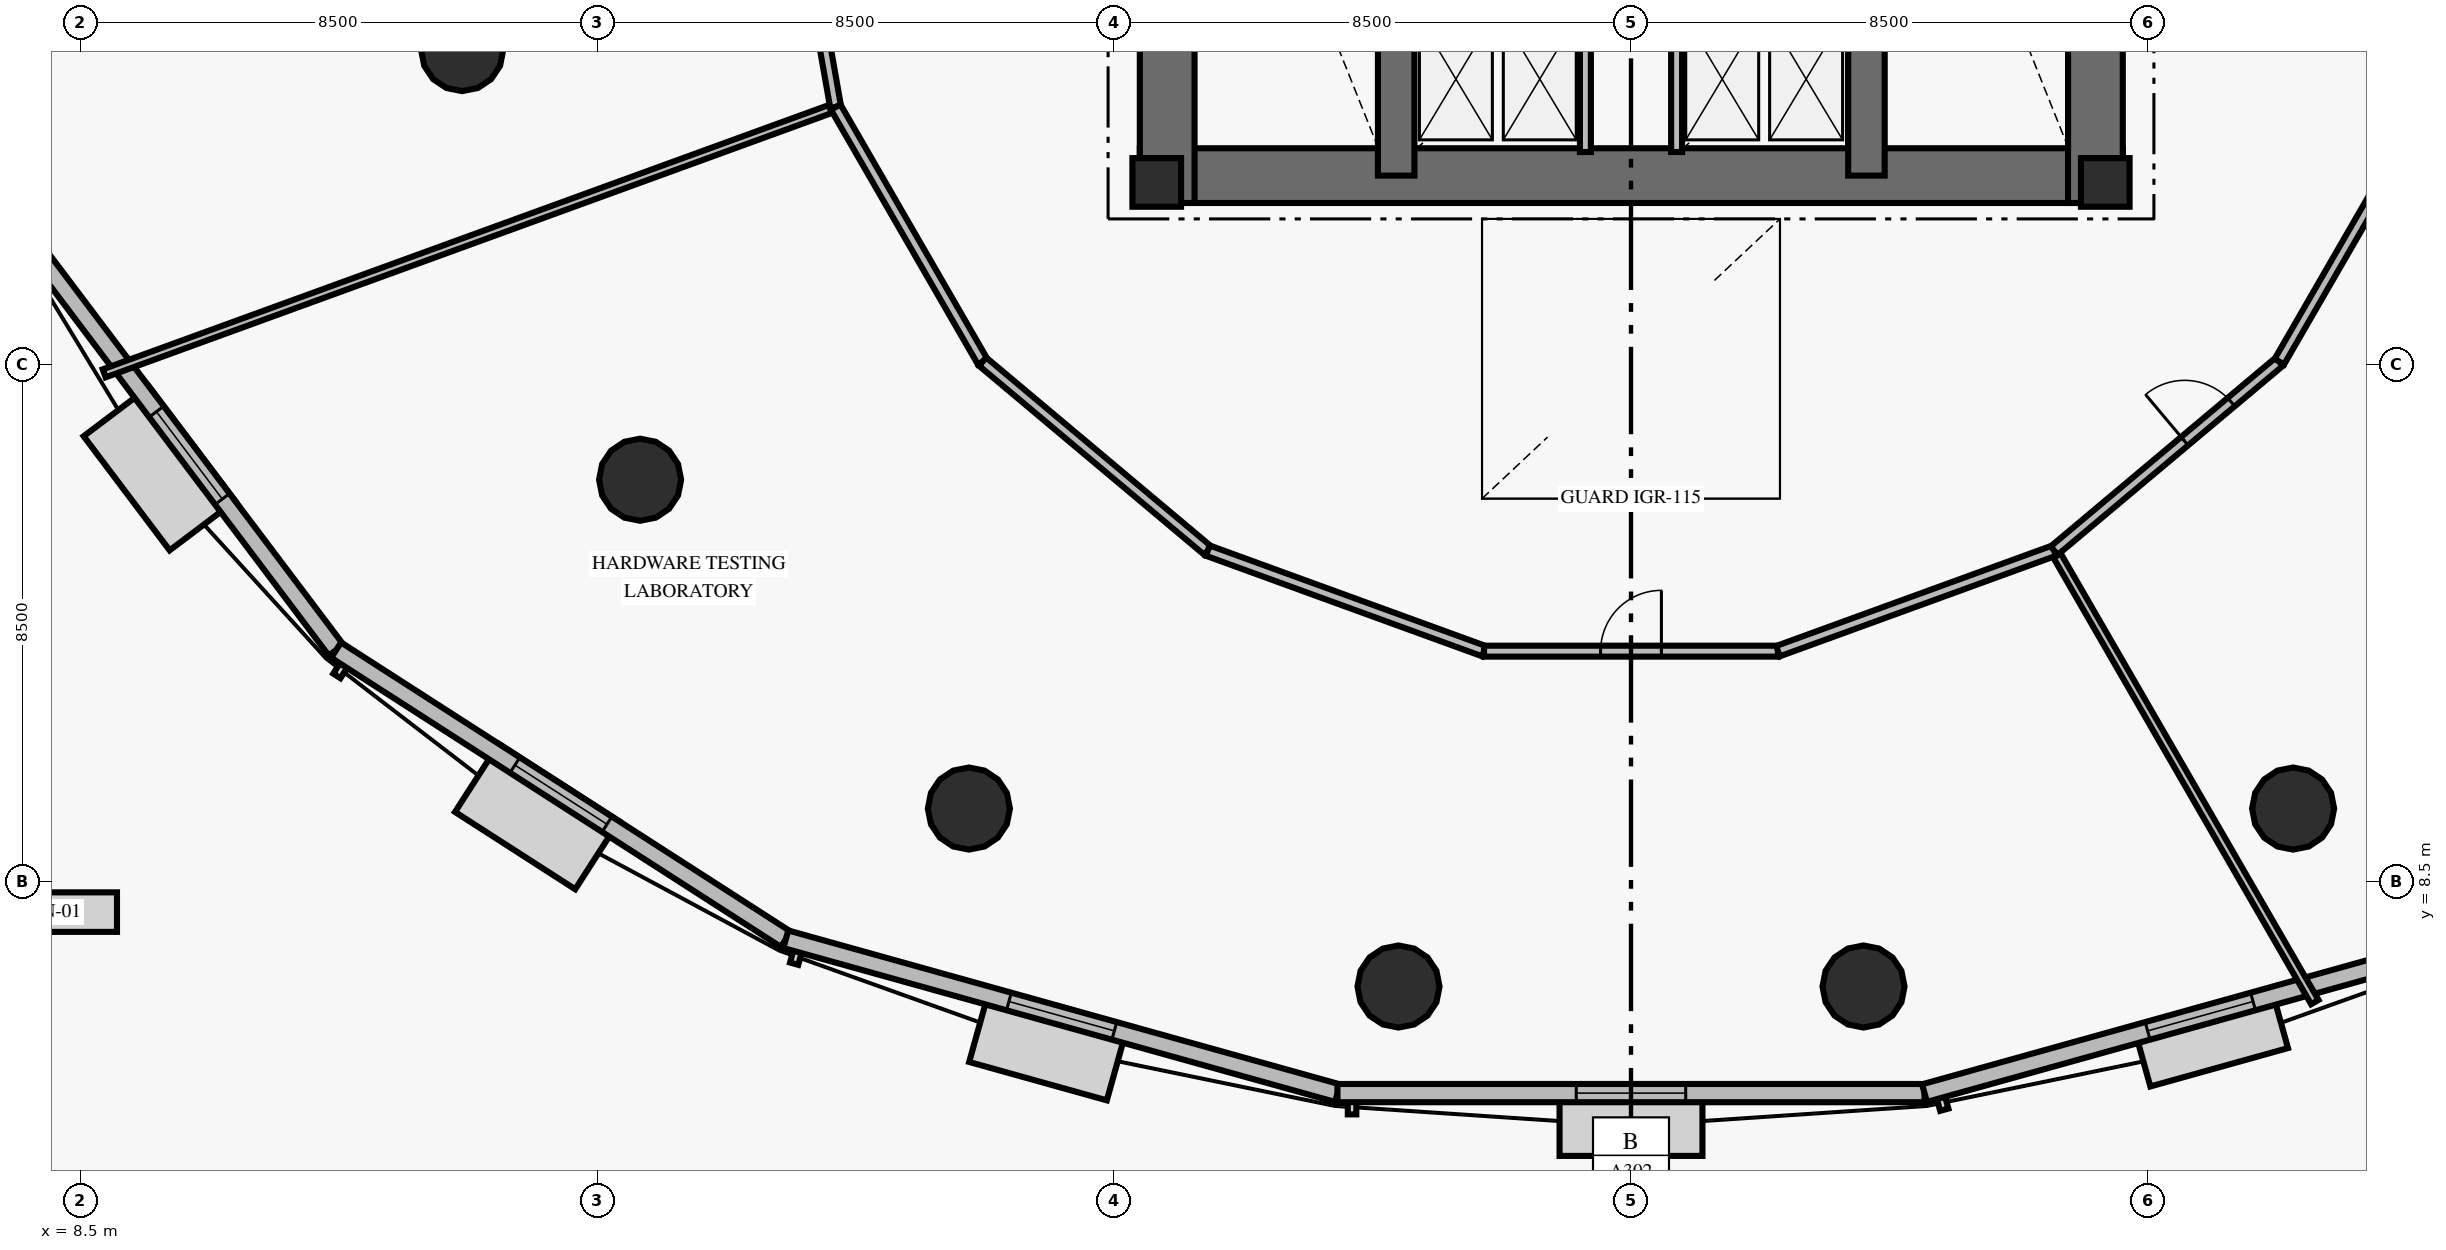
"""IFC4 building model, lengths in metres.
Left out: names, types, materials, properties, quantities, classifications, styles, units other than length and angle.
Written with IfcOpenShell. Run it as: python <this file> out.ifc"""

import sys

from ifc_helpers import new_model, si_unit, direction, frame, frame_2d, origin, origin_2d, place, context, subcontext, project, spatial, rectangle, circle, extrude, element, fill, save


model = new_model("IFC4")
c1 = context("Model", 3, precision=1e-05, world=origin(), true_north=direction((0.0, 1.0)))
c2 = subcontext(c1, "Body", "Model", "MODEL_VIEW")
j1 = project(units=[si_unit("LENGTHUNIT", "METRE"), si_unit("PLANEANGLEUNIT", "RADIAN")], contexts=[c1])
p1 = place(None, origin())
s1 = spatial("IfcSite", under=j1, at=p1, CompositionType="ELEMENT")
p2 = place(p1, origin())
s2 = spatial("IfcBuilding", under=s1, at=p2, CompositionType="ELEMENT")
p3 = place(p2, frame((0.0, 0.0, 30.0)))
s3 = spatial("IfcBuildingStorey", under=s2, at=p3, CompositionType="ELEMENT", Elevation=30.0)
p4 = place(p3, frame((25.922, 20.112, 0.0), z_axis=(0.0, 0.0, 1.0), x_axis=(1.0, 0.0, 0.0)))
e1 = element("IfcWall", 1, at=p4, inside=s3, PredefinedType="SHEAR", context=c2, shape_type="SweptSolid", body=[
    extrude(rectangle(XDim=16.166, YDim=0.9, at=frame_2d((8.083, 0.0))), origin(), (0.0, 0.0, 1.0), 4.2),
])
for number, where, z_axis, x_axis in (
    (2, (26.372, 19.662, 0.0), (0.0, 0.0, 1.0), (0.0, 1.0, 0.0)),
    (3, (41.638, 19.662, 0.0), (0.0, 0.0, 1.0), (0.0, 1.0, 0.0)),
):
    element("IfcWall", number, at=place(p3, frame(where, z_axis=z_axis, x_axis=x_axis)), inside=s3, PredefinedType="SHEAR", context=c2, shape_type="SweptSolid", body=[
        extrude(rectangle(XDim=10.876, YDim=0.9, at=frame_2d((5.438, 0.0))), origin(), (0.0, 0.0, 1.0), 4.2),
    ])
for number, where, z_axis, x_axis in (
    (4, (30.138, 20.112, 0.0), (0.0, 0.0, 1.0), (0.0, 1.0, 0.0)),
    (5, (37.872, 20.112, 0.0), (0.0, 0.0, 1.0), (0.0, 1.0, 0.0)),
):
    element("IfcWall", number, at=place(p3, frame(where, z_axis=z_axis, x_axis=x_axis)), inside=s3, PredefinedType="SHEAR", context=c2, shape_type="SweptSolid", body=[
        extrude(rectangle(XDim=9.976, YDim=0.6, at=frame_2d((4.988, 0.0))), origin(), (0.0, 0.0, 1.0), 4.2),
    ])
for number, where, z_axis, x_axis in (
    (6, (26.2, 20.0, 0.0), (0.0, 0.0, 1.0), (1.0, 0.0, 0.0)),
    (7, (41.8, 20.0, 0.0), (0.0, 0.0, 1.0), (1.0, 0.0, 0.0)),
):
    element("IfcColumn", number, at=place(p3, frame(where, z_axis=z_axis, x_axis=x_axis)), inside=s3, PredefinedType="PILASTER", context=c2, shape_type="SweptSolid", body=[
        extrude(rectangle(XDim=0.8, YDim=0.8, at=origin_2d()), origin(), (0.0, 0.0, 1.0), 4.2),
    ])
for number, where, z_axis, x_axis in (
    (8, (14.777, 22.176, 0.0), (0.0, 0.0, 1.0), (1.0, 0.0, 0.0)),
    (9, (17.703, 15.111, 0.0), (0.0, 0.0, 1.0), (1.0, 0.0, 0.0)),
):
    element("IfcColumn", number, at=place(p3, frame(where, z_axis=z_axis, x_axis=x_axis)), inside=s3, PredefinedType="COLUMN", context=c2, shape_type="SweptSolid", body=[
        extrude(circle(Radius=0.675, at=origin_2d()), origin(), (0.0, 0.0, 1.0), 4.2),
    ])
p5 = place(p3, frame((23.111, 9.703, -0.28), z_axis=(0.0, 0.0, 1.0), x_axis=(1.0, 0.0, 0.0)))
e10 = element("IfcColumn", 10, at=p5, inside=s3, PredefinedType="COLUMN", context=c2, shape_type="SweptSolid", body=[
    extrude(circle(Radius=0.675, at=origin_2d()), origin(), (0.0, 0.0, 1.0), 4.48),
])
for number, where, z_axis, x_axis in (
    (11, (30.176, 6.777, 0.0), (0.0, 0.0, 1.0), (1.0, 0.0, 0.0)),
    (12, (37.824, 6.777, 0.0), (0.0, 0.0, 1.0), (1.0, 0.0, 0.0)),
):
    element("IfcColumn", number, at=place(p3, frame(where, z_axis=z_axis, x_axis=x_axis)), inside=s3, PredefinedType="COLUMN", context=c2, shape_type="SweptSolid", body=[
        extrude(circle(Radius=0.675, at=origin_2d()), origin(), (0.0, 0.0, 1.0), 4.2),
    ])
p6 = place(p3, frame((44.889, 9.703, -0.28), z_axis=(0.0, 0.0, 1.0), x_axis=(1.0, 0.0, 0.0)))
e13 = element("IfcColumn", 13, at=p6, inside=s3, PredefinedType="COLUMN", context=c2, shape_type="SweptSolid", body=[
    extrude(circle(Radius=0.675, at=origin_2d()), origin(), (0.0, 0.0, 1.0), 4.48),
])
p7 = place(p3, frame((7.876, 18.715, 0.0), z_axis=(0.0, 0.0, 1.0), x_axis=(0.601814793535, -0.798635683076, 0.0)))
e14 = element("IfcWall", 14, at=p7, inside=s3, PredefinedType="SOLIDWALL", context=c2, shape_type="SweptSolid", body=[
    extrude(rectangle(XDim=8.022, YDim=0.3, at=frame_2d((4.011, 0.0))), origin(), (0.0, 0.0, 1.0), 3.0),
])
p8 = place(p7, frame((3.111, 0.0, 0.8)))
e15 = element("IfcOpeningElement", 15, at=p8, cuts=e14, PredefinedType="OPENING", context=c2, shape_type="SweptSolid", body=[
    extrude(rectangle(XDim=1.8, YDim=1.95, at=frame_2d((0.9, 0.975))), frame((0.0, 0.16, 0.0), z_axis=(0.0, -1.0, 0.0), x_axis=(1.0, 0.0, 0.0)), (0.0, 0.0, 1.0), 0.32),
])
p9 = place(p3, frame((12.704, 12.309, 0.0), z_axis=(0.0, 0.0, 1.0), x_axis=(0.841162236031, -0.540782851685, 0.0)))
e16 = element("IfcWall", 16, at=p9, inside=s3, PredefinedType="SOLIDWALL", context=c2, shape_type="SweptSolid", body=[
    extrude(rectangle(XDim=8.792, YDim=0.3, at=frame_2d((4.396, 0.0))), origin(), (0.0, 0.0, 1.0), 3.0),
])
p10 = place(p9, frame((3.496, 0.0, 0.8)))
e17 = element("IfcOpeningElement", 17, at=p10, cuts=e16, PredefinedType="OPENING", context=c2, shape_type="SweptSolid", body=[
    extrude(rectangle(XDim=1.8, YDim=1.95, at=frame_2d((0.9, 0.975))), frame((0.0, 0.16, 0.0), z_axis=(0.0, -1.0, 0.0), x_axis=(1.0, 0.0, 0.0)), (0.0, 0.0, 1.0), 0.32),
])
p11 = place(p3, frame((20.1, 7.554, 0.0), z_axis=(0.0, 0.0, 1.0), x_axis=(0.963246695545, -0.268618323133, 0.0)))
e18 = element("IfcWall", 18, at=p11, inside=s3, PredefinedType="SOLIDWALL", context=c2, shape_type="SweptSolid", body=[
    extrude(rectangle(XDim=9.419, YDim=0.3, at=frame_2d((4.709, 0.0))), origin(), (0.0, 0.0, 1.0), 3.0),
])
p12 = place(p11, frame((3.809, 0.0, 0.8)))
e19 = element("IfcOpeningElement", 19, at=p12, cuts=e18, PredefinedType="OPENING", context=c2, shape_type="SweptSolid", body=[
    extrude(rectangle(XDim=1.8, YDim=1.95, at=frame_2d((0.9, 0.975))), frame((0.0, 0.16, 0.0), z_axis=(0.0, -1.0, 0.0), x_axis=(1.0, 0.0, 0.0)), (0.0, 0.0, 1.0), 0.32),
])
p13 = place(p3, frame((29.173, 5.024, 0.0), z_axis=(0.0, 0.0, 1.0), x_axis=(1.0, 0.0, 0.0)))
e20 = element("IfcWall", 20, at=p13, inside=s3, PredefinedType="SOLIDWALL", context=c2, shape_type="SweptSolid", body=[
    extrude(rectangle(XDim=9.655, YDim=0.3, at=frame_2d((4.827, 0.0))), origin(), (0.0, 0.0, 1.0), 3.0),
])
p14 = place(p13, frame((3.927, 0.0, 0.8)))
e21 = element("IfcOpeningElement", 21, at=p14, cuts=e20, PredefinedType="OPENING", context=c2, shape_type="SweptSolid", body=[
    extrude(rectangle(XDim=1.8, YDim=1.95, at=frame_2d((0.9, 0.975))), frame((0.0, 0.16, 0.0), z_axis=(0.0, -1.0, 0.0), x_axis=(1.0, 0.0, 0.0)), (0.0, 0.0, 1.0), 0.32),
])
p15 = place(p3, frame((38.827, 5.024, 0.0), z_axis=(0.0, 0.0, 1.0), x_axis=(0.963246695545, 0.268618323133, 0.0)))
e22 = element("IfcWall", 22, at=p15, inside=s3, PredefinedType="SOLIDWALL", context=c2, shape_type="SweptSolid", body=[
    extrude(rectangle(XDim=9.419, YDim=0.3, at=frame_2d((4.709, 0.0))), origin(), (0.0, 0.0, 1.0), 3.0),
])
p16 = place(p15, frame((3.809, 0.0, 0.8)))
e23 = element("IfcOpeningElement", 23, at=p16, cuts=e22, PredefinedType="OPENING", context=c2, shape_type="SweptSolid", body=[
    extrude(rectangle(XDim=1.8, YDim=1.95, at=frame_2d((0.9, 0.975))), frame((0.0, 0.16, 0.0), z_axis=(0.0, -1.0, 0.0), x_axis=(1.0, 0.0, 0.0)), (0.0, 0.0, 1.0), 0.32),
])
for number, where, z_axis, x_axis in (
    (24, (33.25, 20.5, 0.0), (0.0, 0.0, 1.0), (0.0, 1.0, 0.0)),
    (25, (34.75, 20.5, 0.0), (0.0, 0.0, 1.0), (0.0, 1.0, 0.0)),
):
    element("IfcWall", number, at=place(p3, frame(where, z_axis=z_axis, x_axis=x_axis)), inside=s3, PredefinedType="SOLIDWALL", context=c2, shape_type="SweptSolid", body=[
        extrude(rectangle(XDim=2.42, YDim=0.18, at=frame_2d((1.21, 0.0))), origin(), (0.0, 0.0, 1.0), 2.67),
    ])
p17 = place(p3, frame((20.919, 21.239, 0.0), z_axis=(0.0, 0.0, 1.0), x_axis=(-0.93969037319, -0.342026318481, 0.0)))
e26 = element("IfcWall", 26, at=p17, inside=s3, PredefinedType="PARTITIONING", context=c2, shape_type="SweptSolid", body=[
    extrude(rectangle(XDim=12.802, YDim=0.14, at=frame_2d((6.401, 0.0))), origin(), (0.0, 0.0, 1.0), 2.67),
])
p18 = place(p3, frame((20.08, 26.0, 0.0), z_axis=(0.0, 0.0, 1.0), x_axis=(0.173621119757, -0.984812523669, 0.0)))
e27 = element("IfcWall", 27, at=p18, inside=s3, PredefinedType="PARTITIONING", context=c2, shape_type="SweptSolid", body=[
    extrude(rectangle(XDim=4.834, YDim=0.18, at=frame_2d((2.417, 0.0))), origin(), (0.0, 0.0, 1.0), 2.67),
])
p19 = place(p3, frame((40.96, 13.945, 0.0), z_axis=(0.0, 0.0, 1.0), x_axis=(0.500007596729, -0.866021017767, 0.0)))
e28 = element("IfcWall", 28, at=p19, inside=s3, PredefinedType="PARTITIONING", context=c2, shape_type="SweptSolid", body=[
    extrude(rectangle(XDim=8.573, YDim=0.14, at=frame_2d((4.286, 0.0))), origin(), (0.0, 0.0, 1.0), 2.67),
])
p20 = place(p3, frame((20.919, 21.239, 0.0), z_axis=(0.0, 0.0, 1.0), x_axis=(0.500022634323, -0.866012335458, 0.0)))
e29 = element("IfcWall", 29, at=p20, inside=s3, PredefinedType="PARTITIONING", context=c2, shape_type="SweptSolid", body=[
    extrude(rectangle(XDim=4.834, YDim=0.18, at=frame_2d((2.417, 0.0))), origin(), (0.0, 0.0, 1.0), 2.67),
])
p21 = place(p3, frame((23.337, 17.052, 0.0), z_axis=(0.0, 0.0, 1.0), x_axis=(0.766027093856, -0.642808285167, 0.0)))
e30 = element("IfcWall", 30, at=p21, inside=s3, PredefinedType="PARTITIONING", context=c2, shape_type="SweptSolid", body=[
    extrude(rectangle(XDim=4.834, YDim=0.18, at=frame_2d((2.417, 0.0))), origin(), (0.0, 0.0, 1.0), 2.67),
])
p22 = place(p3, frame((27.04, 13.945, 0.0), z_axis=(0.0, 0.0, 1.0), x_axis=(0.939699018122, -0.342002566277, 0.0)))
e31 = element("IfcWall", 31, at=p22, inside=s3, PredefinedType="PARTITIONING", context=c2, shape_type="SweptSolid", body=[
    extrude(rectangle(XDim=4.834, YDim=0.18, at=frame_2d((2.417, 0.0))), origin(), (0.0, 0.0, 1.0), 2.67),
])
p23 = place(p3, frame((31.583, 12.292, 0.0), z_axis=(0.0, 0.0, 1.0), x_axis=(1.0, 0.0, 0.0)))
e32 = element("IfcWall", 32, at=p23, inside=s3, PredefinedType="PARTITIONING", context=c2, shape_type="SweptSolid", body=[
    extrude(rectangle(XDim=4.834, YDim=0.18, at=frame_2d((2.417, 0.0))), origin(), (0.0, 0.0, 1.0), 2.67),
])
p24 = place(p23, frame((1.917, 0.0, 0.0)))
e33 = element("IfcOpeningElement", 33, at=p24, cuts=e32, PredefinedType="OPENING", context=c2, shape_type="SweptSolid", body=[
    extrude(rectangle(XDim=1.0, YDim=2.15, at=frame_2d((0.5, 1.075))), frame((0.0, 0.1, 0.0), z_axis=(0.0, -1.0, 0.0), x_axis=(1.0, 0.0, 0.0)), (0.0, 0.0, 1.0), 0.2),
])
p25 = place(p3, frame((36.417, 12.292, 0.0), z_axis=(0.0, 0.0, 1.0), x_axis=(0.939699018122, 0.342002566277, 0.0)))
e34 = element("IfcWall", 34, at=p25, inside=s3, PredefinedType="PARTITIONING", context=c2, shape_type="SweptSolid", body=[
    extrude(rectangle(XDim=4.834, YDim=0.18, at=frame_2d((2.417, 0.0))), origin(), (0.0, 0.0, 1.0), 2.67),
])
p26 = place(p3, frame((40.96, 13.945, 0.0), z_axis=(0.0, 0.0, 1.0), x_axis=(0.766027093856, 0.642808285167, 0.0)))
e35 = element("IfcWall", 35, at=p26, inside=s3, PredefinedType="PARTITIONING", context=c2, shape_type="SweptSolid", body=[
    extrude(rectangle(XDim=4.834, YDim=0.18, at=frame_2d((2.417, 0.0))), origin(), (0.0, 0.0, 1.0), 2.67),
])
p27 = place(p26, frame((2.801, 0.0, 0.0)))
e36 = element("IfcOpeningElement", 36, at=p27, cuts=e35, PredefinedType="OPENING", context=c2, shape_type="SweptSolid", body=[
    extrude(rectangle(XDim=1.0, YDim=2.15, at=frame_2d((0.5, 1.075))), frame((0.0, 0.1, 0.0), z_axis=(0.0, -1.0, 0.0), x_axis=(1.0, 0.0, 0.0)), (0.0, 0.0, 1.0), 0.2),
])
p28 = place(p3, frame((44.663, 17.052, 0.0), z_axis=(0.0, 0.0, 1.0), x_axis=(0.500022634323, 0.866012335458, 0.0)))
e37 = element("IfcWall", 37, at=p28, inside=s3, PredefinedType="PARTITIONING", context=c2, shape_type="SweptSolid", body=[
    extrude(rectangle(XDim=4.834, YDim=0.18, at=frame_2d((2.417, 0.0))), origin(), (0.0, 0.0, 1.0), 2.67),
])
p29 = place(p8, origin())
e38 = element("IfcWindow", 38, at=p29, inside=s3, PartitioningType="SINGLE_PANEL", PredefinedType="WINDOW", context=c2, shape_type="SweptSolid", body=[
    extrude(rectangle(XDim=1.8, YDim=1.95, at=frame_2d((0.9, 0.975))), frame((0.0, 0.03, 0.0), z_axis=(0.0, -1.0, 0.0), x_axis=(1.0, 0.0, 0.0)), (0.0, 0.0, 1.0), 0.06),
])
fill(e15, e38)
p30 = place(p10, origin())
e39 = element("IfcWindow", 39, at=p30, inside=s3, PartitioningType="SINGLE_PANEL", PredefinedType="WINDOW", context=c2, shape_type="SweptSolid", body=[
    extrude(rectangle(XDim=1.8, YDim=1.95, at=frame_2d((0.9, 0.975))), frame((0.0, 0.03, 0.0), z_axis=(0.0, -1.0, 0.0), x_axis=(1.0, 0.0, 0.0)), (0.0, 0.0, 1.0), 0.06),
])
fill(e17, e39)
p31 = place(p12, origin())
e40 = element("IfcWindow", 40, at=p31, inside=s3, PartitioningType="SINGLE_PANEL", PredefinedType="WINDOW", context=c2, shape_type="SweptSolid", body=[
    extrude(rectangle(XDim=1.8, YDim=1.95, at=frame_2d((0.9, 0.975))), frame((0.0, 0.03, 0.0), z_axis=(0.0, -1.0, 0.0), x_axis=(1.0, 0.0, 0.0)), (0.0, 0.0, 1.0), 0.06),
])
fill(e19, e40)
p32 = place(p14, origin())
e41 = element("IfcWindow", 41, at=p32, inside=s3, PartitioningType="SINGLE_PANEL", PredefinedType="WINDOW", context=c2, shape_type="SweptSolid", body=[
    extrude(rectangle(XDim=1.8, YDim=1.95, at=frame_2d((0.9, 0.975))), frame((0.0, 0.03, 0.0), z_axis=(0.0, -1.0, 0.0), x_axis=(1.0, 0.0, 0.0)), (0.0, 0.0, 1.0), 0.06),
])
fill(e21, e41)
p33 = place(p16, origin())
e42 = element("IfcWindow", 42, at=p33, inside=s3, PartitioningType="SINGLE_PANEL", PredefinedType="WINDOW", context=c2, shape_type="SweptSolid", body=[
    extrude(rectangle(XDim=1.8, YDim=1.95, at=frame_2d((0.9, 0.975))), frame((0.0, 0.03, 0.0), z_axis=(0.0, -1.0, 0.0), x_axis=(1.0, 0.0, 0.0)), (0.0, 0.0, 1.0), 0.06),
])
fill(e23, e42)
p34 = place(p24, origin())
e43 = element("IfcDoor", 43, at=p34, inside=s3, OperationType="SINGLE_SWING_RIGHT", PredefinedType="DOOR", context=c2, shape_type="SweptSolid", body=[
    extrude(rectangle(XDim=1.0, YDim=2.15, at=frame_2d((0.5, 1.075))), frame((0.0, 0.025, 0.0), z_axis=(0.0, -1.0, 0.0), x_axis=(1.0, 0.0, 0.0)), (0.0, 0.0, 1.0), 0.05),
])
fill(e33, e43)
p35 = place(p27, origin())
e44 = element("IfcDoor", 44, at=p35, inside=s3, OperationType="SINGLE_SWING_LEFT", PredefinedType="DOOR", context=c2, shape_type="SweptSolid", body=[
    extrude(rectangle(XDim=1.0, YDim=2.15, at=frame_2d((0.5, 1.075))), frame((0.0, 0.025, 0.0), z_axis=(0.0, -1.0, 0.0), x_axis=(1.0, 0.0, 0.0)), (0.0, 0.0, 1.0), 0.05),
])
fill(e36, e44)
save(model, sys.argv[1])
